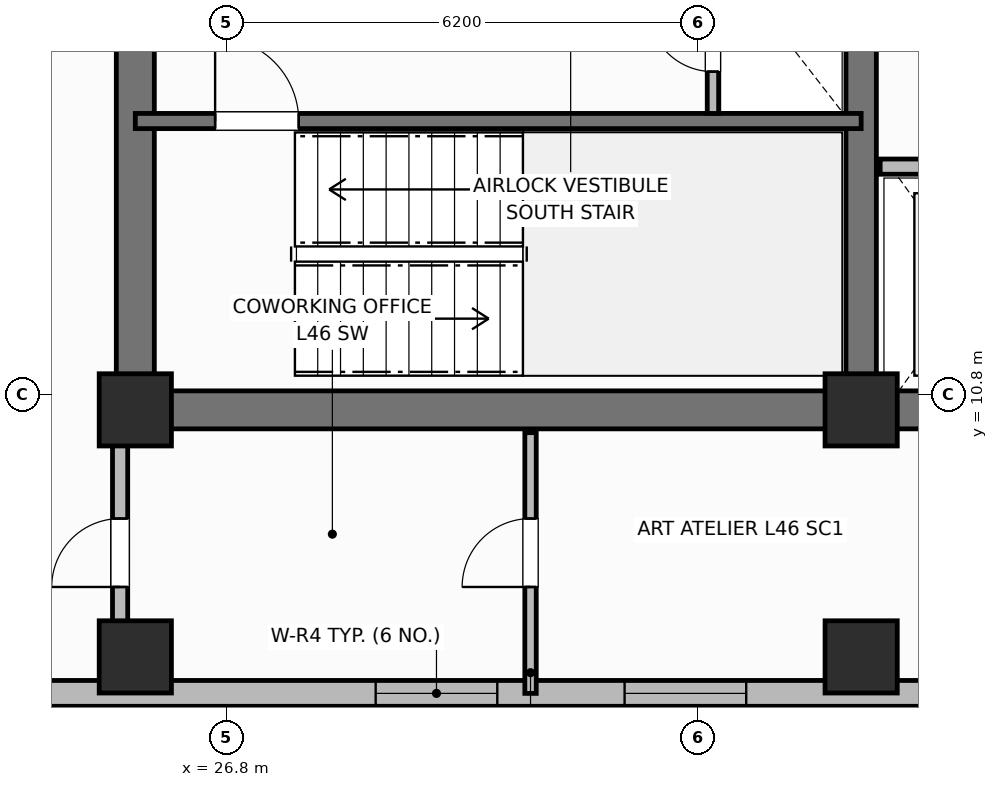
"""IFC4 building model, lengths in metres.
Left out: names, types, materials, properties, quantities, classifications, styles, units other than length and angle.
Written with IfcOpenShell. Run it as: python <this file> out.ifc"""

import sys

from ifc_helpers import new_model, si_unit, direction, frame, frame_2d, origin, origin_2d, place, context, subcontext, project, spatial, rectangle, extrude, element, fill, save


model = new_model("IFC4")
c1 = context("Model", 3, precision=1e-05, world=origin(), true_north=direction((0.0, 1.0)))
c2 = subcontext(c1, "Body", "Model", "MODEL_VIEW")
j1 = project(units=[si_unit("LENGTHUNIT", "METRE"), si_unit("PLANEANGLEUNIT", "RADIAN")], contexts=[c1])
p1 = place(None, origin())
s1 = spatial("IfcSite", under=j1, at=p1, CompositionType="ELEMENT")
p2 = place(p1, origin())
s2 = spatial("IfcBuilding", under=s1, at=p2, CompositionType="ELEMENT")
p3 = place(p2, frame((0.0, 0.0, 184.8)))
s3 = spatial("IfcBuildingStorey", under=s2, at=p3, CompositionType="ELEMENT", Elevation=184.8)
p4 = place(p3, frame((52.8, 10.6, 0.0), z_axis=(0.0, 0.0, 1.0), x_axis=(-1.0, 0.0, 0.0)))
e1 = element("IfcWall", 1, at=p4, inside=s3, PredefinedType="SHEAR", context=c2, shape_type="SweptSolid", body=[
    extrude(rectangle(XDim=27.2, YDim=0.5, at=frame_2d((13.6, 0.0))), origin(), (0.0, 0.0, 1.0), 3.7),
])
p5 = place(p3, frame((25.6, 10.85, 0.0), z_axis=(0.0, 0.0, 1.0), x_axis=(0.0, 1.0, 0.0)))
e2 = element("IfcWall", 2, at=p5, inside=s3, PredefinedType="SHEAR", context=c2, shape_type="SweptSolid", body=[
    extrude(rectangle(XDim=5.7, YDim=0.5, at=frame_2d((2.85, 0.0))), origin(), (0.0, 0.0, 1.0), 3.7),
])
p6 = place(p3, frame((35.15, 10.85, 0.0), z_axis=(0.0, 0.0, 1.0), x_axis=(0.0, 1.0, 0.0)))
e3 = element("IfcWall", 3, at=p6, inside=s3, PredefinedType="SHEAR", context=c2, shape_type="SweptSolid", body=[
    extrude(rectangle(XDim=5.7, YDim=0.4, at=frame_2d((2.85, 0.0))), origin(), (0.0, 0.0, 1.0), 3.7),
])
for number, where, z_axis, x_axis in (
    (4, (25.6, 10.6, 0.0), (0.0, 0.0, 1.0), (1.0, 0.0, 0.0)),
    (5, (35.15, 10.6, 0.0), (0.0, 0.0, 1.0), (1.0, 0.0, 0.0)),
    (6, (25.6, 7.35, 0.0), (0.0, 0.0, 1.0), (1.0, 0.0, 0.0)),
    (7, (35.15, 7.35, 0.0), (0.0, 0.0, 1.0), (1.0, 0.0, 0.0)),
):
    element("IfcColumn", number, at=place(p3, frame(where, z_axis=z_axis, x_axis=x_axis)), inside=s3, PredefinedType="COLUMN", context=c2, shape_type="SweptSolid", body=[
        extrude(rectangle(XDim=0.95, YDim=0.95, at=origin_2d()), origin(), (0.0, 0.0, 1.0), 3.7),
    ])
p7 = place(p3, frame((20.2, 6.87, 0.0), z_axis=(0.0, 0.0, 1.0), x_axis=(1.0, 0.0, 0.0)))
e8 = element("IfcWall", 8, at=p7, inside=s3, PredefinedType="SOLIDWALL", context=c2, shape_type="SweptSolid", body=[
    extrude(rectangle(XDim=15.8, YDim=0.34, at=frame_2d((7.9, 0.0))), origin(), (0.0, 0.0, 1.0), 2.72),
])
p8 = place(p7, frame((8.562, 0.0, 0.7)))
e9 = element("IfcOpeningElement", 9, at=p8, cuts=e8, PredefinedType="OPENING", context=c2, shape_type="SweptSolid", body=[
    extrude(rectangle(XDim=1.6, YDim=1.9, at=frame_2d((0.8, 0.95))), frame((0.0, 0.18, 0.0), z_axis=(0.0, -1.0, 0.0), x_axis=(1.0, 0.0, 0.0)), (0.0, 0.0, 1.0), 0.36),
])
p9 = place(p7, frame((11.837, 0.0, 0.7)))
e10 = element("IfcOpeningElement", 10, at=p9, cuts=e8, PredefinedType="OPENING", context=c2, shape_type="SweptSolid", body=[
    extrude(rectangle(XDim=1.6, YDim=1.9, at=frame_2d((0.8, 0.95))), frame((0.0, 0.18, 0.0), z_axis=(0.0, -1.0, 0.0), x_axis=(1.0, 0.0, 0.0)), (0.0, 0.0, 1.0), 0.36),
])
p10 = place(p3, frame((25.6, 14.4, 0.0), z_axis=(0.0, 0.0, 1.0), x_axis=(1.0, 0.0, 0.0)))
e11 = element("IfcWall", 11, at=p10, inside=s3, PredefinedType="SHEAR", context=c2, shape_type="SweptSolid", body=[
    extrude(rectangle(XDim=9.55, YDim=0.2, at=frame_2d((4.775, 0.0))), origin(), (0.0, 0.0, 1.0), 3.7),
])
p11 = place(p10, frame((1.05, 0.0, 0.0)))
e12 = element("IfcOpeningElement", 12, at=p11, cuts=e11, PredefinedType="OPENING", context=c2, shape_type="SweptSolid", body=[
    extrude(rectangle(XDim=1.1, YDim=2.15, at=frame_2d((0.55, 1.075))), frame((0.0, 0.11, 0.0), z_axis=(0.0, -1.0, 0.0), x_axis=(1.0, 0.0, 0.0)), (0.0, 0.0, 1.0), 0.22),
])
p12 = place(p3, frame((33.2, 14.5, 0.0), z_axis=(0.0, 0.0, 1.0), x_axis=(0.0, 1.0, 0.0)))
e13 = element("IfcWall", 13, at=p12, inside=s3, PredefinedType="PARTITIONING", context=c2, shape_type="SweptSolid", body=[
    extrude(rectangle(XDim=2.08, YDim=0.15, at=frame_2d((1.04, 0.0))), origin(), (0.0, 0.0, 1.0), 2.55),
])
p13 = place(p12, frame((0.55, 0.0, 0.0)))
e14 = element("IfcOpeningElement", 14, at=p13, cuts=e13, PredefinedType="OPENING", context=c2, shape_type="SweptSolid", body=[
    extrude(rectangle(XDim=0.85, YDim=2.05, at=frame_2d((0.425, 1.025))), frame((0.0, 0.085, 0.0), z_axis=(0.0, -1.0, 0.0), x_axis=(1.0, 0.0, 0.0)), (0.0, 0.0, 1.0), 0.17),
])
p14 = place(p3, frame((35.4, 13.8, 0.0), z_axis=(0.0, 0.0, 1.0), x_axis=(1.0, 0.0, 0.0)))
e15 = element("IfcWall", 15, at=p14, inside=s3, PredefinedType="PARTITIONING", context=c2, shape_type="SweptSolid", body=[
    extrude(rectangle(XDim=7.6, YDim=0.2, at=frame_2d((3.8, 0.0))), origin(), (0.0, 0.0, 1.0), 2.32),
])
p15 = place(p14, frame((0.7, 0.0, 0.0)))
e16 = element("IfcOpeningElement", 16, at=p15, cuts=e15, PredefinedType="OPENING", context=c2, shape_type="SweptSolid", body=[
    extrude(rectangle(XDim=1.1, YDim=2.15, at=frame_2d((0.55, 1.075))), frame((0.0, 0.11, 0.0), z_axis=(0.0, -1.0, 0.0), x_axis=(1.0, 0.0, 0.0)), (0.0, 0.0, 1.0), 0.22),
])
p16 = place(p14, frame((3.35, 0.0, 0.0)))
e17 = element("IfcOpeningElement", 17, at=p16, cuts=e15, PredefinedType="OPENING", context=c2, shape_type="SweptSolid", body=[
    extrude(rectangle(XDim=1.2, YDim=2.15, at=frame_2d((0.6, 1.075))), frame((0.0, 0.11, 0.0), z_axis=(0.0, -1.0, 0.0), x_axis=(1.0, 0.0, 0.0)), (0.0, 0.0, 1.0), 0.22),
])
p17 = place(p3, frame((30.8, 6.87, 0.0), z_axis=(0.0, 0.0, 1.0), x_axis=(0.0, 1.0, 0.0)))
e18 = element("IfcWall", 18, at=p17, inside=s3, PredefinedType="PARTITIONING", context=c2, shape_type="SweptSolid", body=[
    extrude(rectangle(XDim=3.43, YDim=0.15, at=frame_2d((1.715, 0.0))), origin(), (0.0, 0.0, 1.0), 2.55),
])
p18 = place(p17, frame((1.4, 0.0, 0.0)))
e19 = element("IfcOpeningElement", 19, at=p18, cuts=e18, PredefinedType="OPENING", context=c2, shape_type="SweptSolid", body=[
    extrude(rectangle(XDim=0.9, YDim=2.1, at=frame_2d((0.45, 1.05))), frame((0.0, 0.085, 0.0), z_axis=(0.0, -1.0, 0.0), x_axis=(1.0, 0.0, 0.0)), (0.0, 0.0, 1.0), 0.17),
])
p19 = place(p3, frame((25.4, 7.62, 0.0), z_axis=(0.0, 0.0, 1.0), x_axis=(0.0, 1.0, 0.0)))
e20 = element("IfcWall", 20, at=p19, inside=s3, PredefinedType="PARTITIONING", context=c2, shape_type="SweptSolid", body=[
    extrude(rectangle(XDim=2.68, YDim=0.2, at=frame_2d((1.34, 0.0))), origin(), (0.0, 0.0, 1.0), 2.55),
])
p20 = place(p19, frame((0.65, 0.0, 0.0)))
e21 = element("IfcOpeningElement", 21, at=p20, cuts=e20, PredefinedType="OPENING", context=c2, shape_type="SweptSolid", body=[
    extrude(rectangle(XDim=0.9, YDim=2.1, at=frame_2d((0.45, 1.05))), frame((0.0, 0.11, 0.0), z_axis=(0.0, -1.0, 0.0), x_axis=(1.0, 0.0, 0.0)), (0.0, 0.0, 1.0), 0.22),
])
p21 = place(p8, origin())
e22 = element("IfcWindow", 22, at=p21, inside=s3, PartitioningType="SINGLE_PANEL", PredefinedType="WINDOW", context=c2, shape_type="SweptSolid", body=[
    extrude(rectangle(XDim=1.6, YDim=1.9, at=frame_2d((0.8, 0.95))), frame((0.0, 0.03, 0.0), z_axis=(0.0, -1.0, 0.0), x_axis=(1.0, 0.0, 0.0)), (0.0, 0.0, 1.0), 0.06),
])
fill(e9, e22)
p22 = place(p9, origin())
e23 = element("IfcWindow", 23, at=p22, inside=s3, PartitioningType="SINGLE_PANEL", PredefinedType="WINDOW", context=c2, shape_type="SweptSolid", body=[
    extrude(rectangle(XDim=1.6, YDim=1.9, at=frame_2d((0.8, 0.95))), frame((0.0, 0.03, 0.0), z_axis=(0.0, -1.0, 0.0), x_axis=(1.0, 0.0, 0.0)), (0.0, 0.0, 1.0), 0.06),
])
fill(e10, e23)
p23 = place(p11, origin())
e24 = element("IfcDoor", 24, at=p23, inside=s3, OperationType="SINGLE_SWING_LEFT", PredefinedType="DOOR", context=c2, shape_type="SweptSolid", body=[
    extrude(rectangle(XDim=1.1, YDim=2.15, at=frame_2d((0.55, 1.075))), frame((0.0, 0.025, 0.0), z_axis=(0.0, -1.0, 0.0), x_axis=(1.0, 0.0, 0.0)), (0.0, 0.0, 1.0), 0.05),
])
fill(e12, e24)
p24 = place(p13, origin())
e25 = element("IfcDoor", 25, at=p24, inside=s3, OperationType="SINGLE_SWING_RIGHT", PredefinedType="TRAPDOOR", context=c2, shape_type="SweptSolid", body=[
    extrude(rectangle(XDim=0.85, YDim=2.05, at=frame_2d((0.425, 1.025))), frame((0.0, 0.025, 0.0), z_axis=(0.0, -1.0, 0.0), x_axis=(1.0, 0.0, 0.0)), (0.0, 0.0, 1.0), 0.05),
])
fill(e14, e25)
p25 = place(p18, origin())
e26 = element("IfcDoor", 26, at=p25, inside=s3, OperationType="SINGLE_SWING_LEFT", PredefinedType="DOOR", context=c2, shape_type="SweptSolid", body=[
    extrude(rectangle(XDim=0.9, YDim=2.1, at=frame_2d((0.45, 1.05))), frame((0.0, 0.025, 0.0), z_axis=(0.0, -1.0, 0.0), x_axis=(1.0, 0.0, 0.0)), (0.0, 0.0, 1.0), 0.05),
])
fill(e19, e26)
p26 = place(p20, origin())
e27 = element("IfcDoor", 27, at=p26, inside=s3, OperationType="SINGLE_SWING_LEFT", PredefinedType="DOOR", context=c2, shape_type="SweptSolid", body=[
    extrude(rectangle(XDim=0.9, YDim=2.1, at=frame_2d((0.45, 1.05))), frame((0.0, 0.025, 0.0), z_axis=(0.0, -1.0, 0.0), x_axis=(1.0, 0.0, 0.0)), (0.0, 0.0, 1.0), 0.05),
])
fill(e21, e27)
save(model, sys.argv[1])
